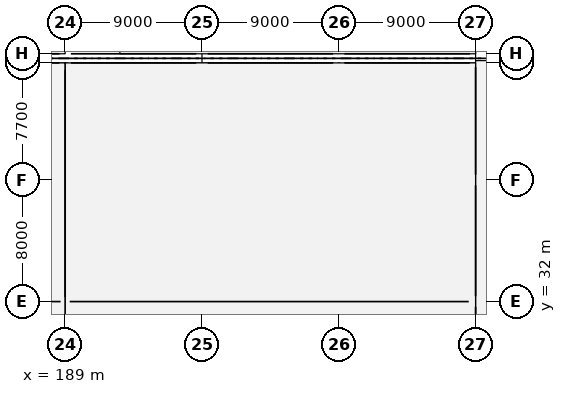
"""IFC4 building model, lengths in metres.
Left out: names, types, materials, properties, quantities, classifications, styles, units other than length and angle.
Written with IfcOpenShell. Run it as: python <this file> out.ifc"""

import sys

from ifc_helpers import new_model, si_unit, direction, frame, frame_2d, origin, origin_2d, place, context, subcontext, project, spatial, rectangle, extrude, element, fill, save


model = new_model("IFC4")
c1 = context("Model", 3, precision=1e-05, world=origin(), true_north=direction((0.0, 1.0)))
c2 = subcontext(c1, "Body", "Model", "MODEL_VIEW")
j1 = project(units=[si_unit("LENGTHUNIT", "METRE"), si_unit("PLANEANGLEUNIT", "RADIAN")], contexts=[c1])
p1 = place(None, origin())
s1 = spatial("IfcSite", under=j1, at=p1, CompositionType="ELEMENT")
p2 = place(p1, origin())
s2 = spatial("IfcBuilding", under=s1, at=p2, CompositionType="ELEMENT")
p3 = place(p2, origin())
s3 = spatial("IfcBuildingStorey", under=s2, at=p3, CompositionType="ELEMENT", Elevation=0.0)
for number, where, z_axis, x_axis in (
    (1, (189.0, 32.0, -0.5), (0.0, 0.0, 1.0), (1.0, 0.0, 0.0)),
    (2, (189.0, 40.0, -0.5), (0.0, 0.0, 1.0), (1.0, 0.0, 0.0)),
):
    element("IfcColumn", number, at=place(p3, frame(where, z_axis=z_axis, x_axis=x_axis)), inside=s3, PredefinedType="COLUMN", context=c2, shape_type="SweptSolid", body=[
        extrude(rectangle(XDim=0.7, YDim=0.7, at=origin_2d()), origin(), (0.0, 0.0, 1.0), 6.8),
    ])
for number, where, z_axis, x_axis in (
    (3, (189.0, 47.7, -0.5), (0.0, 0.0, 1.0), (1.0, 0.0, 0.0)),
    (4, (189.0, 48.3, -0.5), (0.0, 0.0, 1.0), (1.0, 0.0, 0.0)),
):
    element("IfcColumn", number, at=place(p3, frame(where, z_axis=z_axis, x_axis=x_axis)), inside=s3, PredefinedType="COLUMN", context=c2, shape_type="SweptSolid", body=[
        extrude(rectangle(XDim=0.75, YDim=0.55, at=origin_2d()), origin(), (0.0, 0.0, 1.0), 6.8),
    ])
for number, where, z_axis, x_axis in (
    (5, (198.0, 32.0, -0.5), (0.0, 0.0, 1.0), (1.0, 0.0, 0.0)),
    (6, (198.0, 40.0, -0.5), (0.0, 0.0, 1.0), (1.0, 0.0, 0.0)),
):
    element("IfcColumn", number, at=place(p3, frame(where, z_axis=z_axis, x_axis=x_axis)), inside=s3, PredefinedType="COLUMN", context=c2, shape_type="SweptSolid", body=[
        extrude(rectangle(XDim=0.7, YDim=0.7, at=origin_2d()), origin(), (0.0, 0.0, 1.0), 6.8),
    ])
for number, where, z_axis, x_axis in (
    (7, (198.0, 47.7, -0.5), (0.0, 0.0, 1.0), (1.0, 0.0, 0.0)),
    (8, (198.0, 48.3, -0.5), (0.0, 0.0, 1.0), (1.0, 0.0, 0.0)),
):
    element("IfcColumn", number, at=place(p3, frame(where, z_axis=z_axis, x_axis=x_axis)), inside=s3, PredefinedType="COLUMN", context=c2, shape_type="SweptSolid", body=[
        extrude(rectangle(XDim=0.75, YDim=0.55, at=origin_2d()), origin(), (0.0, 0.0, 1.0), 6.8),
    ])
for number, where, z_axis, x_axis in (
    (9, (207.0, 32.0, -0.5), (0.0, 0.0, 1.0), (1.0, 0.0, 0.0)),
    (10, (207.0, 40.0, -0.5), (0.0, 0.0, 1.0), (1.0, 0.0, 0.0)),
):
    element("IfcColumn", number, at=place(p3, frame(where, z_axis=z_axis, x_axis=x_axis)), inside=s3, PredefinedType="COLUMN", context=c2, shape_type="SweptSolid", body=[
        extrude(rectangle(XDim=0.7, YDim=0.7, at=origin_2d()), origin(), (0.0, 0.0, 1.0), 6.8),
    ])
for number, where, z_axis, x_axis in (
    (11, (207.0, 47.7, -0.5), (0.0, 0.0, 1.0), (1.0, 0.0, 0.0)),
    (12, (207.0, 48.3, -0.5), (0.0, 0.0, 1.0), (1.0, 0.0, 0.0)),
):
    element("IfcColumn", number, at=place(p3, frame(where, z_axis=z_axis, x_axis=x_axis)), inside=s3, PredefinedType="COLUMN", context=c2, shape_type="SweptSolid", body=[
        extrude(rectangle(XDim=0.75, YDim=0.55, at=origin_2d()), origin(), (0.0, 0.0, 1.0), 6.8),
    ])
for number, where, z_axis, x_axis in (
    (13, (216.0, 32.0, -0.5), (0.0, 0.0, 1.0), (1.0, 0.0, 0.0)),
    (14, (216.0, 40.0, -0.5), (0.0, 0.0, 1.0), (1.0, 0.0, 0.0)),
):
    element("IfcColumn", number, at=place(p3, frame(where, z_axis=z_axis, x_axis=x_axis)), inside=s3, PredefinedType="COLUMN", context=c2, shape_type="SweptSolid", body=[
        extrude(rectangle(XDim=0.7, YDim=0.7, at=origin_2d()), origin(), (0.0, 0.0, 1.0), 6.8),
    ])
for number, where, z_axis, x_axis in (
    (15, (216.0, 47.7, -0.5), (0.0, 0.0, 1.0), (1.0, 0.0, 0.0)),
    (16, (216.0, 48.3, -0.5), (0.0, 0.0, 1.0), (1.0, 0.0, 0.0)),
):
    element("IfcColumn", number, at=place(p3, frame(where, z_axis=z_axis, x_axis=x_axis)), inside=s3, PredefinedType="COLUMN", context=c2, shape_type="SweptSolid", body=[
        extrude(rectangle(XDim=0.75, YDim=0.55, at=origin_2d()), origin(), (0.0, 0.0, 1.0), 6.8),
    ])
p4 = place(p3, frame((180.375, 47.7, 0.0), z_axis=(0.0, 0.0, 1.0), x_axis=(1.0, 0.0, 0.0)))
e17 = element("IfcWall", 17, at=p4, inside=s3, PredefinedType="SOLIDWALL", context=c2, shape_type="SweptSolid", body=[
    extrude(rectangle(XDim=8.25, YDim=0.34, at=frame_2d((4.125, 0.0))), origin(), (0.0, 0.0, 1.0), 5.1),
])
p5 = place(p4, frame((1.75, 0.0, 0.85)))
e18 = element("IfcOpeningElement", 18, at=p5, cuts=e17, PredefinedType="OPENING", context=c2, shape_type="SweptSolid", body=[
    extrude(rectangle(XDim=2.0, YDim=3.3, at=frame_2d((1.0, 1.65))), frame((0.0, 0.18, 0.0), z_axis=(0.0, -1.0, 0.0), x_axis=(1.0, 0.0, 0.0)), (0.0, 0.0, 1.0), 0.36),
])
p6 = place(p4, frame((4.5, 0.0, 0.85)))
e19 = element("IfcOpeningElement", 19, at=p6, cuts=e17, PredefinedType="OPENING", context=c2, shape_type="SweptSolid", body=[
    extrude(rectangle(XDim=2.0, YDim=3.3, at=frame_2d((1.0, 1.65))), frame((0.0, 0.18, 0.0), z_axis=(0.0, -1.0, 0.0), x_axis=(1.0, 0.0, 0.0)), (0.0, 0.0, 1.0), 0.36),
])
p7 = place(p3, frame((189.375, 47.7, 0.0), z_axis=(0.0, 0.0, 1.0), x_axis=(1.0, 0.0, 0.0)))
e20 = element("IfcWall", 20, at=p7, inside=s3, PredefinedType="SOLIDWALL", context=c2, shape_type="SweptSolid", body=[
    extrude(rectangle(XDim=8.25, YDim=0.34, at=frame_2d((4.125, 0.0))), origin(), (0.0, 0.0, 1.0), 5.1),
])
p8 = place(p7, frame((1.85, 0.0, 0.85)))
e21 = element("IfcOpeningElement", 21, at=p8, cuts=e20, PredefinedType="OPENING", context=c2, shape_type="SweptSolid", body=[
    extrude(rectangle(XDim=1.8, YDim=3.15, at=frame_2d((0.9, 1.575))), frame((0.0, 0.18, 0.0), z_axis=(0.0, -1.0, 0.0), x_axis=(1.0, 0.0, 0.0)), (0.0, 0.0, 1.0), 0.36),
])
p9 = place(p7, frame((4.6, 0.0, 0.85)))
e22 = element("IfcOpeningElement", 22, at=p9, cuts=e20, PredefinedType="OPENING", context=c2, shape_type="SweptSolid", body=[
    extrude(rectangle(XDim=1.8, YDim=3.15, at=frame_2d((0.9, 1.575))), frame((0.0, 0.18, 0.0), z_axis=(0.0, -1.0, 0.0), x_axis=(1.0, 0.0, 0.0)), (0.0, 0.0, 1.0), 0.36),
])
p10 = place(p3, frame((198.375, 47.7, 0.0), z_axis=(0.0, 0.0, 1.0), x_axis=(1.0, 0.0, 0.0)))
e23 = element("IfcWall", 23, at=p10, inside=s3, PredefinedType="SOLIDWALL", context=c2, shape_type="SweptSolid", body=[
    extrude(rectangle(XDim=8.25, YDim=0.34, at=frame_2d((4.125, 0.0))), origin(), (0.0, 0.0, 1.0), 5.1),
])
p11 = place(p10, frame((1.75, 0.0, 0.85)))
e24 = element("IfcOpeningElement", 24, at=p11, cuts=e23, PredefinedType="OPENING", context=c2, shape_type="SweptSolid", body=[
    extrude(rectangle(XDim=2.0, YDim=3.3, at=frame_2d((1.0, 1.65))), frame((0.0, 0.18, 0.0), z_axis=(0.0, -1.0, 0.0), x_axis=(1.0, 0.0, 0.0)), (0.0, 0.0, 1.0), 0.36),
])
p12 = place(p10, frame((4.5, 0.0, 0.85)))
e25 = element("IfcOpeningElement", 25, at=p12, cuts=e23, PredefinedType="OPENING", context=c2, shape_type="SweptSolid", body=[
    extrude(rectangle(XDim=2.0, YDim=3.3, at=frame_2d((1.0, 1.65))), frame((0.0, 0.18, 0.0), z_axis=(0.0, -1.0, 0.0), x_axis=(1.0, 0.0, 0.0)), (0.0, 0.0, 1.0), 0.36),
])
p13 = place(p3, frame((207.375, 47.7, 0.0), z_axis=(0.0, 0.0, 1.0), x_axis=(1.0, 0.0, 0.0)))
e26 = element("IfcWall", 26, at=p13, inside=s3, PredefinedType="SOLIDWALL", context=c2, shape_type="SweptSolid", body=[
    extrude(rectangle(XDim=8.25, YDim=0.34, at=frame_2d((4.125, 0.0))), origin(), (0.0, 0.0, 1.0), 5.1),
])
p14 = place(p13, frame((1.85, 0.0, 0.85)))
e27 = element("IfcOpeningElement", 27, at=p14, cuts=e26, PredefinedType="OPENING", context=c2, shape_type="SweptSolid", body=[
    extrude(rectangle(XDim=1.8, YDim=3.15, at=frame_2d((0.9, 1.575))), frame((0.0, 0.18, 0.0), z_axis=(0.0, -1.0, 0.0), x_axis=(1.0, 0.0, 0.0)), (0.0, 0.0, 1.0), 0.36),
])
p15 = place(p13, frame((4.6, 0.0, 0.85)))
e28 = element("IfcOpeningElement", 28, at=p15, cuts=e26, PredefinedType="OPENING", context=c2, shape_type="SweptSolid", body=[
    extrude(rectangle(XDim=1.8, YDim=3.15, at=frame_2d((0.9, 1.575))), frame((0.0, 0.18, 0.0), z_axis=(0.0, -1.0, 0.0), x_axis=(1.0, 0.0, 0.0)), (0.0, 0.0, 1.0), 0.36),
])
p16 = place(p3, frame((216.0, 24.35, 0.0), z_axis=(0.0, 0.0, 1.0), x_axis=(0.0, 1.0, 0.0)))
e29 = element("IfcWall", 29, at=p16, inside=s3, PredefinedType="SOLIDWALL", context=c2, shape_type="SweptSolid", body=[
    extrude(rectangle(XDim=7.3, YDim=0.34, at=frame_2d((3.65, 0.0))), origin(), (0.0, 0.0, 1.0), 5.1),
])
p17 = place(p16, frame((0.937, 0.0, 0.85)))
e30 = element("IfcOpeningElement", 30, at=p17, cuts=e29, PredefinedType="OPENING", context=c2, shape_type="SweptSolid", body=[
    extrude(rectangle(XDim=2.0, YDim=3.3, at=frame_2d((1.0, 1.65))), frame((0.0, 0.18, 0.0), z_axis=(0.0, -1.0, 0.0), x_axis=(1.0, 0.0, 0.0)), (0.0, 0.0, 1.0), 0.36),
])
p18 = place(p16, frame((3.867, 0.0, 0.85)))
e31 = element("IfcOpeningElement", 31, at=p18, cuts=e29, PredefinedType="OPENING", context=c2, shape_type="SweptSolid", body=[
    extrude(rectangle(XDim=2.0, YDim=3.3, at=frame_2d((1.0, 1.65))), frame((0.0, 0.18, 0.0), z_axis=(0.0, -1.0, 0.0), x_axis=(1.0, 0.0, 0.0)), (0.0, 0.0, 1.0), 0.36),
])
p19 = place(p3, frame((216.0, 32.35, 0.0), z_axis=(0.0, 0.0, 1.0), x_axis=(0.0, 1.0, 0.0)))
e32 = element("IfcWall", 32, at=p19, inside=s3, PredefinedType="SOLIDWALL", context=c2, shape_type="SweptSolid", body=[
    extrude(rectangle(XDim=7.3, YDim=0.34, at=frame_2d((3.65, 0.0))), origin(), (0.0, 0.0, 1.0), 5.1),
])
p20 = place(p19, frame((2.45, 0.0, 0.0)))
e33 = element("IfcOpeningElement", 33, at=p20, cuts=e32, PredefinedType="OPENING", context=c2, shape_type="SweptSolid", body=[
    extrude(rectangle(XDim=2.4, YDim=3.1, at=frame_2d((1.2, 1.55))), frame((0.0, 0.18, 0.0), z_axis=(0.0, -1.0, 0.0), x_axis=(1.0, 0.0, 0.0)), (0.0, 0.0, 1.0), 0.36),
])
p21 = place(p3, frame((216.0, 40.35, 0.0), z_axis=(0.0, 0.0, 1.0), x_axis=(0.0, 1.0, 0.0)))
e34 = element("IfcWall", 34, at=p21, inside=s3, PredefinedType="SOLIDWALL", context=c2, shape_type="SweptSolid", body=[
    extrude(rectangle(XDim=7.075, YDim=0.34, at=frame_2d((3.538, 0.0))), origin(), (0.0, 0.0, 1.0), 5.1),
])
p22 = place(p21, frame((2.338, 0.0, 0.0)))
e35 = element("IfcOpeningElement", 35, at=p22, cuts=e34, PredefinedType="OPENING", context=c2, shape_type="SweptSolid", body=[
    extrude(rectangle(XDim=2.4, YDim=3.1, at=frame_2d((1.2, 1.55))), frame((0.0, 0.18, 0.0), z_axis=(0.0, -1.0, 0.0), x_axis=(1.0, 0.0, 0.0)), (0.0, 0.0, 1.0), 0.36),
])
p23 = place(p3, frame((180.375, 48.3, 0.0), z_axis=(0.0, 0.0, 1.0), x_axis=(1.0, 0.0, 0.0)))
e36 = element("IfcWall", 36, at=p23, inside=s3, PredefinedType="SOLIDWALL", context=c2, shape_type="SweptSolid", body=[
    extrude(rectangle(XDim=8.25, YDim=0.34, at=frame_2d((4.125, 0.0))), origin(), (0.0, 0.0, 1.0), 5.1),
])
p24 = place(p23, frame((1.55, 0.0, 0.9)))
e37 = element("IfcOpeningElement", 37, at=p24, cuts=e36, PredefinedType="OPENING", context=c2, shape_type="SweptSolid", body=[
    extrude(rectangle(XDim=2.4, YDim=3.5, at=frame_2d((1.2, 1.75))), frame((0.0, 0.18, 0.0), z_axis=(0.0, -1.0, 0.0), x_axis=(1.0, 0.0, 0.0)), (0.0, 0.0, 1.0), 0.36),
])
p25 = place(p23, frame((4.3, 0.0, 0.9)))
e38 = element("IfcOpeningElement", 38, at=p25, cuts=e36, PredefinedType="OPENING", context=c2, shape_type="SweptSolid", body=[
    extrude(rectangle(XDim=2.4, YDim=3.5, at=frame_2d((1.2, 1.75))), frame((0.0, 0.18, 0.0), z_axis=(0.0, -1.0, 0.0), x_axis=(1.0, 0.0, 0.0)), (0.0, 0.0, 1.0), 0.36),
])
p26 = place(p3, frame((189.375, 48.3, 0.0), z_axis=(0.0, 0.0, 1.0), x_axis=(1.0, 0.0, 0.0)))
e39 = element("IfcWall", 39, at=p26, inside=s3, PredefinedType="SOLIDWALL", context=c2, shape_type="SweptSolid", body=[
    extrude(rectangle(XDim=8.25, YDim=0.34, at=frame_2d((4.125, 0.0))), origin(), (0.0, 0.0, 1.0), 5.1),
])
p27 = place(p26, frame((1.55, 0.0, 0.9)))
e40 = element("IfcOpeningElement", 40, at=p27, cuts=e39, PredefinedType="OPENING", context=c2, shape_type="SweptSolid", body=[
    extrude(rectangle(XDim=2.4, YDim=3.5, at=frame_2d((1.2, 1.75))), frame((0.0, 0.18, 0.0), z_axis=(0.0, -1.0, 0.0), x_axis=(1.0, 0.0, 0.0)), (0.0, 0.0, 1.0), 0.36),
])
p28 = place(p26, frame((4.3, 0.0, 0.9)))
e41 = element("IfcOpeningElement", 41, at=p28, cuts=e39, PredefinedType="OPENING", context=c2, shape_type="SweptSolid", body=[
    extrude(rectangle(XDim=2.4, YDim=3.5, at=frame_2d((1.2, 1.75))), frame((0.0, 0.18, 0.0), z_axis=(0.0, -1.0, 0.0), x_axis=(1.0, 0.0, 0.0)), (0.0, 0.0, 1.0), 0.36),
])
p29 = place(p3, frame((198.375, 48.3, 0.0), z_axis=(0.0, 0.0, 1.0), x_axis=(1.0, 0.0, 0.0)))
e42 = element("IfcWall", 42, at=p29, inside=s3, PredefinedType="SOLIDWALL", context=c2, shape_type="SweptSolid", body=[
    extrude(rectangle(XDim=8.25, YDim=0.34, at=frame_2d((4.125, 0.0))), origin(), (0.0, 0.0, 1.0), 5.1),
])
p30 = place(p29, frame((1.55, 0.0, 0.9)))
e43 = element("IfcOpeningElement", 43, at=p30, cuts=e42, PredefinedType="OPENING", context=c2, shape_type="SweptSolid", body=[
    extrude(rectangle(XDim=2.4, YDim=3.5, at=frame_2d((1.2, 1.75))), frame((0.0, 0.18, 0.0), z_axis=(0.0, -1.0, 0.0), x_axis=(1.0, 0.0, 0.0)), (0.0, 0.0, 1.0), 0.36),
])
p31 = place(p29, frame((4.3, 0.0, 0.9)))
e44 = element("IfcOpeningElement", 44, at=p31, cuts=e42, PredefinedType="OPENING", context=c2, shape_type="SweptSolid", body=[
    extrude(rectangle(XDim=2.4, YDim=3.5, at=frame_2d((1.2, 1.75))), frame((0.0, 0.18, 0.0), z_axis=(0.0, -1.0, 0.0), x_axis=(1.0, 0.0, 0.0)), (0.0, 0.0, 1.0), 0.36),
])
p32 = place(p3, frame((207.375, 48.3, 0.0), z_axis=(0.0, 0.0, 1.0), x_axis=(1.0, 0.0, 0.0)))
e45 = element("IfcWall", 45, at=p32, inside=s3, PredefinedType="SOLIDWALL", context=c2, shape_type="SweptSolid", body=[
    extrude(rectangle(XDim=8.25, YDim=0.34, at=frame_2d((4.125, 0.0))), origin(), (0.0, 0.0, 1.0), 5.1),
])
p33 = place(p32, frame((1.55, 0.0, 0.9)))
e46 = element("IfcOpeningElement", 46, at=p33, cuts=e45, PredefinedType="OPENING", context=c2, shape_type="SweptSolid", body=[
    extrude(rectangle(XDim=2.4, YDim=3.5, at=frame_2d((1.2, 1.75))), frame((0.0, 0.18, 0.0), z_axis=(0.0, -1.0, 0.0), x_axis=(1.0, 0.0, 0.0)), (0.0, 0.0, 1.0), 0.36),
])
p34 = place(p32, frame((4.3, 0.0, 0.9)))
e47 = element("IfcOpeningElement", 47, at=p34, cuts=e45, PredefinedType="OPENING", context=c2, shape_type="SweptSolid", body=[
    extrude(rectangle(XDim=2.4, YDim=3.5, at=frame_2d((1.2, 1.75))), frame((0.0, 0.18, 0.0), z_axis=(0.0, -1.0, 0.0), x_axis=(1.0, 0.0, 0.0)), (0.0, 0.0, 1.0), 0.36),
])
p35 = place(p3, frame((144.75, 32.0, 0.0), z_axis=(0.0, 0.0, 1.0), x_axis=(1.0, 0.0, 0.0)))
e48 = element("IfcWall", 48, at=p35, inside=s3, PredefinedType="PARTITIONING", context=c2, shape_type="SweptSolid", body=[
    extrude(rectangle(XDim=43.95, YDim=0.125, at=frame_2d((21.975, 0.0))), origin(), (0.0, 0.0, 1.0), 5.25),
])
p36 = place(p35, frame((12.25, 0.0, 0.0)))
e49 = element("IfcOpeningElement", 49, at=p36, cuts=e48, PredefinedType="OPENING", context=c2, shape_type="SweptSolid", body=[
    extrude(rectangle(XDim=1.0, YDim=2.15, at=frame_2d((0.5, 1.075))), frame((0.0, 0.073, 0.0), z_axis=(0.0, -1.0, 0.0), x_axis=(1.0, 0.0, 0.0)), (0.0, 0.0, 1.0), 0.145),
])
p37 = place(p3, frame((189.3, 32.0, 0.0), z_axis=(0.0, 0.0, 1.0), x_axis=(1.0, 0.0, 0.0)))
e50 = element("IfcWall", 50, at=p37, inside=s3, PredefinedType="PARTITIONING", context=c2, shape_type="SweptSolid", body=[
    extrude(rectangle(XDim=26.25, YDim=0.11, at=frame_2d((13.125, 0.0))), origin(), (0.0, 0.0, 1.0), 5.25),
])
p38 = place(p37, frame((12.71, 0.0, 0.0)))
e51 = element("IfcOpeningElement", 51, at=p38, cuts=e50, PredefinedType="OPENING", context=c2, shape_type="SweptSolid", body=[
    extrude(rectangle(XDim=0.98, YDim=2.12, at=frame_2d((0.49, 1.06))), frame((0.0, 0.065, 0.0), z_axis=(0.0, -1.0, 0.0), x_axis=(1.0, 0.0, 0.0)), (0.0, 0.0, 1.0), 0.13),
])
p39 = place(p3, frame((189.0, 32.3, 0.0), z_axis=(0.0, 0.0, 1.0), x_axis=(0.0, 1.0, 0.0)))
e52 = element("IfcWall", 52, at=p39, inside=s3, PredefinedType="PARTITIONING", context=c2, shape_type="SweptSolid", body=[
    extrude(rectangle(XDim=14.95, YDim=0.1, at=frame_2d((7.475, 0.0))), origin(), (0.0, 0.0, 1.0), 5.35),
])
p40 = place(p8, origin())
e53 = element("IfcWindow", 53, at=p40, inside=s3, PartitioningType="DOUBLE_PANEL_VERTICAL", PredefinedType="WINDOW", context=c2, shape_type="SweptSolid", body=[
    extrude(rectangle(XDim=1.8, YDim=3.15, at=frame_2d((0.9, 1.575))), frame((0.0, 0.03, 0.0), z_axis=(0.0, -1.0, 0.0), x_axis=(1.0, 0.0, 0.0)), (0.0, 0.0, 1.0), 0.06),
])
fill(e21, e53)
p41 = place(p9, origin())
e54 = element("IfcWindow", 54, at=p41, inside=s3, PartitioningType="DOUBLE_PANEL_VERTICAL", PredefinedType="WINDOW", context=c2, shape_type="SweptSolid", body=[
    extrude(rectangle(XDim=1.8, YDim=3.15, at=frame_2d((0.9, 1.575))), frame((0.0, 0.03, 0.0), z_axis=(0.0, -1.0, 0.0), x_axis=(1.0, 0.0, 0.0)), (0.0, 0.0, 1.0), 0.06),
])
fill(e22, e54)
p42 = place(p11, origin())
e55 = element("IfcWindow", 55, at=p42, inside=s3, PartitioningType="DOUBLE_PANEL_VERTICAL", PredefinedType="WINDOW", context=c2, shape_type="SweptSolid", body=[
    extrude(rectangle(XDim=2.0, YDim=3.3, at=frame_2d((1.0, 1.65))), frame((0.0, 0.03, 0.0), z_axis=(0.0, -1.0, 0.0), x_axis=(1.0, 0.0, 0.0)), (0.0, 0.0, 1.0), 0.06),
])
fill(e24, e55)
p43 = place(p12, origin())
e56 = element("IfcWindow", 56, at=p43, inside=s3, PartitioningType="DOUBLE_PANEL_VERTICAL", PredefinedType="WINDOW", context=c2, shape_type="SweptSolid", body=[
    extrude(rectangle(XDim=2.0, YDim=3.3, at=frame_2d((1.0, 1.65))), frame((0.0, 0.03, 0.0), z_axis=(0.0, -1.0, 0.0), x_axis=(1.0, 0.0, 0.0)), (0.0, 0.0, 1.0), 0.06),
])
fill(e25, e56)
p44 = place(p14, origin())
e57 = element("IfcWindow", 57, at=p44, inside=s3, PartitioningType="DOUBLE_PANEL_VERTICAL", PredefinedType="WINDOW", context=c2, shape_type="SweptSolid", body=[
    extrude(rectangle(XDim=1.8, YDim=3.15, at=frame_2d((0.9, 1.575))), frame((0.0, 0.03, 0.0), z_axis=(0.0, -1.0, 0.0), x_axis=(1.0, 0.0, 0.0)), (0.0, 0.0, 1.0), 0.06),
])
fill(e27, e57)
p45 = place(p15, origin())
e58 = element("IfcWindow", 58, at=p45, inside=s3, PartitioningType="DOUBLE_PANEL_VERTICAL", PredefinedType="WINDOW", context=c2, shape_type="SweptSolid", body=[
    extrude(rectangle(XDim=1.8, YDim=3.15, at=frame_2d((0.9, 1.575))), frame((0.0, 0.03, 0.0), z_axis=(0.0, -1.0, 0.0), x_axis=(1.0, 0.0, 0.0)), (0.0, 0.0, 1.0), 0.06),
])
fill(e28, e58)
p46 = place(p20, origin())
e59 = element("IfcDoor", 59, at=p46, inside=s3, OperationType="DOUBLE_DOOR_SINGLE_SWING", PredefinedType="DOOR", context=c2, shape_type="SweptSolid", body=[
    extrude(rectangle(XDim=2.4, YDim=3.1, at=frame_2d((1.2, 1.55))), frame((0.0, 0.025, 0.0), z_axis=(0.0, -1.0, 0.0), x_axis=(1.0, 0.0, 0.0)), (0.0, 0.0, 1.0), 0.05),
])
fill(e33, e59)
p47 = place(p22, origin())
e60 = element("IfcDoor", 60, at=p47, inside=s3, OperationType="DOUBLE_DOOR_SINGLE_SWING", PredefinedType="DOOR", context=c2, shape_type="SweptSolid", body=[
    extrude(rectangle(XDim=2.4, YDim=3.1, at=frame_2d((1.2, 1.55))), frame((0.0, 0.025, 0.0), z_axis=(0.0, -1.0, 0.0), x_axis=(1.0, 0.0, 0.0)), (0.0, 0.0, 1.0), 0.05),
])
fill(e35, e60)
p48 = place(p27, origin())
e61 = element("IfcWindow", 61, at=p48, inside=s3, PartitioningType="TRIPLE_PANEL_VERTICAL", PredefinedType="WINDOW", context=c2, shape_type="SweptSolid", body=[
    extrude(rectangle(XDim=2.4, YDim=3.5, at=frame_2d((1.2, 1.75))), frame((0.0, 0.03, 0.0), z_axis=(0.0, -1.0, 0.0), x_axis=(1.0, 0.0, 0.0)), (0.0, 0.0, 1.0), 0.06),
])
fill(e40, e61)
p49 = place(p28, origin())
e62 = element("IfcWindow", 62, at=p49, inside=s3, PartitioningType="TRIPLE_PANEL_VERTICAL", PredefinedType="WINDOW", context=c2, shape_type="SweptSolid", body=[
    extrude(rectangle(XDim=2.4, YDim=3.5, at=frame_2d((1.2, 1.75))), frame((0.0, 0.03, 0.0), z_axis=(0.0, -1.0, 0.0), x_axis=(1.0, 0.0, 0.0)), (0.0, 0.0, 1.0), 0.06),
])
fill(e41, e62)
p50 = place(p30, origin())
e63 = element("IfcWindow", 63, at=p50, inside=s3, PartitioningType="TRIPLE_PANEL_VERTICAL", PredefinedType="WINDOW", context=c2, shape_type="SweptSolid", body=[
    extrude(rectangle(XDim=2.4, YDim=3.5, at=frame_2d((1.2, 1.75))), frame((0.0, 0.03, 0.0), z_axis=(0.0, -1.0, 0.0), x_axis=(1.0, 0.0, 0.0)), (0.0, 0.0, 1.0), 0.06),
])
fill(e43, e63)
p51 = place(p31, origin())
e64 = element("IfcWindow", 64, at=p51, inside=s3, PartitioningType="TRIPLE_PANEL_VERTICAL", PredefinedType="WINDOW", context=c2, shape_type="SweptSolid", body=[
    extrude(rectangle(XDim=2.4, YDim=3.5, at=frame_2d((1.2, 1.75))), frame((0.0, 0.03, 0.0), z_axis=(0.0, -1.0, 0.0), x_axis=(1.0, 0.0, 0.0)), (0.0, 0.0, 1.0), 0.06),
])
fill(e44, e64)
p52 = place(p33, origin())
e65 = element("IfcWindow", 65, at=p52, inside=s3, PartitioningType="TRIPLE_PANEL_VERTICAL", PredefinedType="WINDOW", context=c2, shape_type="SweptSolid", body=[
    extrude(rectangle(XDim=2.4, YDim=3.5, at=frame_2d((1.2, 1.75))), frame((0.0, 0.03, 0.0), z_axis=(0.0, -1.0, 0.0), x_axis=(1.0, 0.0, 0.0)), (0.0, 0.0, 1.0), 0.06),
])
fill(e46, e65)
p53 = place(p34, origin())
e66 = element("IfcWindow", 66, at=p53, inside=s3, PartitioningType="TRIPLE_PANEL_VERTICAL", PredefinedType="WINDOW", context=c2, shape_type="SweptSolid", body=[
    extrude(rectangle(XDim=2.4, YDim=3.5, at=frame_2d((1.2, 1.75))), frame((0.0, 0.03, 0.0), z_axis=(0.0, -1.0, 0.0), x_axis=(1.0, 0.0, 0.0)), (0.0, 0.0, 1.0), 0.06),
])
fill(e47, e66)
p54 = place(p38, origin())
e67 = element("IfcDoor", 67, at=p54, inside=s3, OperationType="SINGLE_SWING_LEFT", PredefinedType="DOOR", context=c2, shape_type="SweptSolid", body=[
    extrude(rectangle(XDim=0.98, YDim=2.12, at=frame_2d((0.49, 1.06))), frame((0.0, 0.025, 0.0), z_axis=(0.0, -1.0, 0.0), x_axis=(1.0, 0.0, 0.0)), (0.0, 0.0, 1.0), 0.05),
])
fill(e51, e67)
save(model, sys.argv[1])
